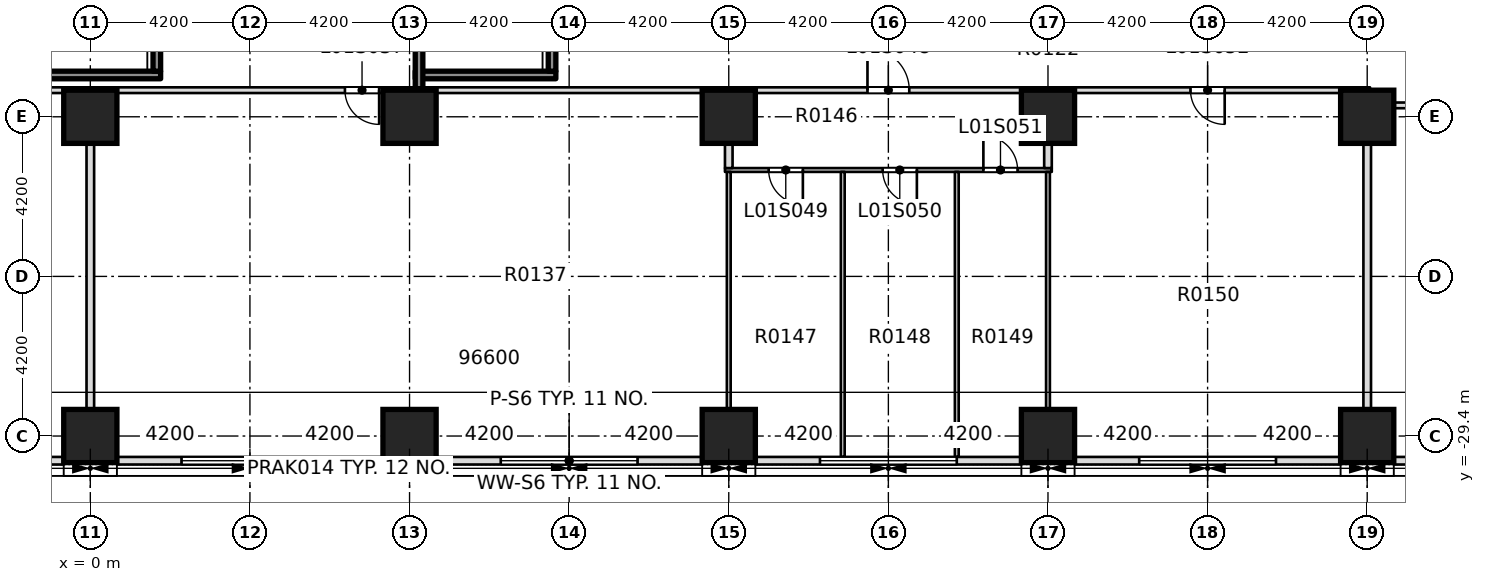
"""IFC4 building model, lengths in metres.
Left out: names, types, materials, properties, quantities, classifications, styles, units other than length and angle.
Written with IfcOpenShell. Run it as: python <this file> out.ifc"""

import sys

from ifc_helpers import new_model, si_unit, direction, frame, frame_2d, origin, origin_2d, place, context, subcontext, project, spatial, rectangle, extrude, element, fill, save


model = new_model("IFC4")
c1 = context("Model", 3, precision=1e-05, world=origin(), true_north=direction((0.0, 1.0)))
c2 = subcontext(c1, "Body", "Model", "MODEL_VIEW")
j1 = project(units=[si_unit("LENGTHUNIT", "METRE"), si_unit("PLANEANGLEUNIT", "RADIAN")], contexts=[c1])
p1 = place(None, origin())
s1 = spatial("IfcSite", under=j1, at=p1, CompositionType="ELEMENT")
p2 = place(p1, origin())
s2 = spatial("IfcBuilding", under=s1, at=p2, CompositionType="ELEMENT")
p3 = place(p2, frame((0.0, 0.0, 7.5)))
s3 = spatial("IfcBuildingStorey", under=s2, at=p3, CompositionType="ELEMENT", Elevation=7.5)
for number, where, z_axis, x_axis in (
    (1, (0.0, -21.0, -0.4), (0.0, 0.0, 1.0), (1.0, 0.0, 0.0)),
    (2, (8.4, -21.0, -0.4), (0.0, 0.0, 1.0), (1.0, 0.0, 0.0)),
    (3, (16.8, -21.0, -0.4), (0.0, 0.0, 1.0), (1.0, 0.0, 0.0)),
    (4, (0.0, -29.4, 0.0), (0.0, 0.0, 1.0), (1.0, 0.0, 0.0)),
    (5, (8.4, -29.4, 0.0), (0.0, 0.0, 1.0), (1.0, 0.0, 0.0)),
    (6, (16.8, -29.4, 0.0), (0.0, 0.0, 1.0), (1.0, 0.0, 0.0)),
    (7, (25.2, -29.4, 0.0), (0.0, 0.0, 1.0), (1.0, 0.0, 0.0)),
):
    element("IfcColumn", number, at=place(p3, frame(where, z_axis=z_axis, x_axis=x_axis)), inside=s3, PredefinedType="COLUMN", context=c2, shape_type="SweptSolid", body=[
        extrude(rectangle(XDim=1.4, YDim=1.4, at=origin_2d()), origin(), (0.0, 0.0, 1.0), 5.0),
    ])
p4 = place(p3, frame((33.6, -29.4, 0.0), z_axis=(0.0, 0.0, 1.0), x_axis=(1.0, 0.0, 0.0)))
e8 = element("IfcColumn", 8, at=p4, inside=s3, PredefinedType="COLUMN", context=c2, shape_type="SweptSolid", body=[
    extrude(rectangle(XDim=1.4, YDim=1.4, at=origin_2d()), origin(), (0.0, 0.0, 1.0), 4.6),
])
p5 = place(p3, frame((25.2, -21.0, 0.0), z_axis=(0.0, 0.0, 1.0), x_axis=(1.0, 0.0, 0.0)))
e9 = element("IfcColumn", 9, at=p5, inside=s3, PredefinedType="COLUMN", context=c2, shape_type="SweptSolid", body=[
    extrude(rectangle(XDim=1.4, YDim=1.4, at=origin_2d()), origin(), (0.0, 0.0, 1.0), 5.0),
])
p6 = place(p3, frame((33.6, -21.0, 0.0), z_axis=(0.0, 0.0, 1.0), x_axis=(1.0, 0.0, 0.0)))
e10 = element("IfcColumn", 10, at=p6, inside=s3, PredefinedType="COLUMN", context=c2, shape_type="SweptSolid", body=[
    extrude(rectangle(XDim=1.4, YDim=1.4, at=origin_2d()), origin(), (0.0, 0.0, 1.0), 4.6),
])
p7 = place(p3, frame((16.7, -22.4, 0.0), z_axis=(0.0, 0.0, 1.0), x_axis=(1.0, 0.0, 0.0)))
e11 = element("IfcWall", 11, at=p7, inside=s3, PredefinedType="PARTITIONING", context=c2, shape_type="SweptSolid", body=[
    extrude(rectangle(XDim=8.6, YDim=0.1, at=frame_2d((4.3, 0.0))), origin(), (0.0, 0.0, 1.0), 4.6),
])
p8 = place(p7, frame((1.15, 0.0, 0.0)))
e12 = element("IfcOpeningElement", 12, at=p8, cuts=e11, PredefinedType="OPENING", context=c2, shape_type="SweptSolid", body=[
    extrude(rectangle(XDim=0.9, YDim=2.1, at=frame_2d((0.45, 1.05))), frame((0.0, 0.06, 0.0), z_axis=(0.0, -1.0, 0.0), x_axis=(1.0, 0.0, 0.0)), (0.0, 0.0, 1.0), 0.12),
])
p9 = place(p7, frame((4.15, 0.0, 0.0)))
e13 = element("IfcOpeningElement", 13, at=p9, cuts=e11, PredefinedType="OPENING", context=c2, shape_type="SweptSolid", body=[
    extrude(rectangle(XDim=0.9, YDim=2.1, at=frame_2d((0.45, 1.05))), frame((0.0, 0.06, 0.0), z_axis=(0.0, -1.0, 0.0), x_axis=(1.0, 0.0, 0.0)), (0.0, 0.0, 1.0), 0.12),
])
p10 = place(p7, frame((6.8, 0.0, 0.0)))
e14 = element("IfcOpeningElement", 14, at=p10, cuts=e11, PredefinedType="OPENING", context=c2, shape_type="SweptSolid", body=[
    extrude(rectangle(XDim=0.9, YDim=2.1, at=frame_2d((0.45, 1.05))), frame((0.0, 0.06, 0.0), z_axis=(0.0, -1.0, 0.0), x_axis=(1.0, 0.0, 0.0)), (0.0, 0.0, 1.0), 0.12),
])
p11 = place(p3, frame((33.5, -20.7, 0.0), z_axis=(0.0, 0.0, 1.0), x_axis=(1.0, 0.0, 0.0)))
e15 = element("IfcWall", 15, at=p11, inside=s3, PredefinedType="PARTITIONING", context=c2, shape_type="SweptSolid", body=[
    extrude(rectangle(XDim=16.975, YDim=0.15, at=frame_2d((8.488, 0.0))), origin(), (0.0, 0.0, 1.0), 4.6),
])
p12 = place(p11, frame((9.3, 0.0, 0.0)))
e16 = element("IfcOpeningElement", 16, at=p12, cuts=e15, PredefinedType="OPENING", context=c2, shape_type="SweptSolid", body=[
    extrude(rectangle(XDim=0.9, YDim=2.1, at=frame_2d((0.45, 1.05))), frame((0.0, 0.085, 0.0), z_axis=(0.0, -1.0, 0.0), x_axis=(1.0, 0.0, 0.0)), (0.0, 0.0, 1.0), 0.17),
])
p13 = place(p3, frame((-34.15, -20.3, 0.0), z_axis=(0.0, 0.0, 1.0), x_axis=(1.0, 0.0, 0.0)))
e17 = element("IfcWall", 17, at=p13, inside=s3, PredefinedType="PARTITIONING", context=c2, shape_type="SweptSolid", body=[
    extrude(rectangle(XDim=67.825, YDim=0.15, at=frame_2d((33.913, 0.0))), origin(), (0.0, 0.0, 1.0), 4.6),
])
p14 = place(p13, frame((12.6, 0.0, 0.0)))
e18 = element("IfcOpeningElement", 18, at=p14, cuts=e17, PredefinedType="OPENING", context=c2, shape_type="SweptSolid", body=[
    extrude(rectangle(XDim=1.1, YDim=2.1, at=frame_2d((0.55, 1.05))), frame((0.0, 0.085, 0.0), z_axis=(0.0, -1.0, 0.0), x_axis=(1.0, 0.0, 0.0)), (0.0, 0.0, 1.0), 0.17),
])
p15 = place(p13, frame((4.025, 0.0, 0.0)))
e19 = element("IfcOpeningElement", 19, at=p15, cuts=e17, PredefinedType="OPENING", context=c2, shape_type="SweptSolid", body=[
    extrude(rectangle(XDim=0.9, YDim=2.1, at=frame_2d((0.45, 1.05))), frame((0.0, 0.085, 0.0), z_axis=(0.0, -1.0, 0.0), x_axis=(1.0, 0.0, 0.0)), (0.0, 0.0, 1.0), 0.17),
])
p16 = place(p13, frame((26.5, 0.0, 0.0)))
e20 = element("IfcOpeningElement", 20, at=p16, cuts=e17, PredefinedType="OPENING", context=c2, shape_type="SweptSolid", body=[
    extrude(rectangle(XDim=0.9, YDim=2.1, at=frame_2d((0.45, 1.05))), frame((0.0, 0.085, 0.0), z_axis=(0.0, -1.0, 0.0), x_axis=(1.0, 0.0, 0.0)), (0.0, 0.0, 1.0), 0.17),
])
p17 = place(p13, frame((40.85, 0.0, 0.0)))
e21 = element("IfcOpeningElement", 21, at=p17, cuts=e17, PredefinedType="OPENING", context=c2, shape_type="SweptSolid", body=[
    extrude(rectangle(XDim=0.9, YDim=2.1, at=frame_2d((0.45, 1.05))), frame((0.0, 0.085, 0.0), z_axis=(0.0, -1.0, 0.0), x_axis=(1.0, 0.0, 0.0)), (0.0, 0.0, 1.0), 0.17),
])
p18 = place(p13, frame((54.6, 0.0, 0.0)))
e22 = element("IfcOpeningElement", 22, at=p18, cuts=e17, PredefinedType="OPENING", context=c2, shape_type="SweptSolid", body=[
    extrude(rectangle(XDim=1.1, YDim=2.1, at=frame_2d((0.55, 1.05))), frame((0.0, 0.085, 0.0), z_axis=(0.0, -1.0, 0.0), x_axis=(1.0, 0.0, 0.0)), (0.0, 0.0, 1.0), 0.17),
])
p19 = place(p13, frame((63.1, 0.0, 0.0)))
e23 = element("IfcOpeningElement", 23, at=p19, cuts=e17, PredefinedType="OPENING", context=c2, shape_type="SweptSolid", body=[
    extrude(rectangle(XDim=0.9, YDim=2.1, at=frame_2d((0.45, 1.05))), frame((0.0, 0.085, 0.0), z_axis=(0.0, -1.0, 0.0), x_axis=(1.0, 0.0, 0.0)), (0.0, 0.0, 1.0), 0.17),
])
p20 = place(p3, frame((0.0, -29.95, 0.0), z_axis=(0.0, 0.0, 1.0), x_axis=(0.0, 1.0, 0.0)))
e24 = element("IfcWall", 24, at=p20, inside=s3, PredefinedType="PARTITIONING", context=c2, shape_type="SweptSolid", body=[
    extrude(rectangle(XDim=9.575, YDim=0.2, at=frame_2d((4.788, 0.0))), origin(), (0.0, 0.0, 1.0), 4.6),
])
p21 = place(p3, frame((16.8, -29.95, 0.0), z_axis=(0.0, 0.0, 1.0), x_axis=(0.0, 1.0, 0.0)))
e25 = element("IfcWall", 25, at=p21, inside=s3, PredefinedType="PARTITIONING", context=c2, shape_type="SweptSolid", body=[
    extrude(rectangle(XDim=7.5, YDim=0.1, at=frame_2d((3.75, 0.0))), origin(), (0.0, 0.0, 1.0), 4.6),
])
p22 = place(p3, frame((16.8, -22.35, 0.0), z_axis=(0.0, 0.0, 1.0), x_axis=(0.0, 1.0, 0.0)))
e26 = element("IfcWall", 26, at=p22, inside=s3, PredefinedType="PARTITIONING", context=c2, shape_type="SweptSolid", body=[
    extrude(rectangle(XDim=1.975, YDim=0.2, at=frame_2d((0.988, 0.0))), origin(), (0.0, 0.0, 1.0), 4.6),
])
for number, where, z_axis, x_axis in (
    (27, (19.8, -29.95, 0.0), (0.0, 0.0, 1.0), (0.0, 1.0, 0.0)),
    (28, (22.8, -29.95, 0.0), (0.0, 0.0, 1.0), (0.0, 1.0, 0.0)),
    (29, (25.2, -29.95, 0.0), (0.0, 0.0, 1.0), (0.0, 1.0, 0.0)),
):
    element("IfcWall", number, at=place(p3, frame(where, z_axis=z_axis, x_axis=x_axis)), inside=s3, PredefinedType="PARTITIONING", context=c2, shape_type="SweptSolid", body=[
        extrude(rectangle(XDim=7.5, YDim=0.1, at=frame_2d((3.75, 0.0))), origin(), (0.0, 0.0, 1.0), 4.6),
    ])
p23 = place(p3, frame((25.2, -22.35, 0.0), z_axis=(0.0, 0.0, 1.0), x_axis=(0.0, 1.0, 0.0)))
e30 = element("IfcWall", 30, at=p23, inside=s3, PredefinedType="PARTITIONING", context=c2, shape_type="SweptSolid", body=[
    extrude(rectangle(XDim=1.975, YDim=0.2, at=frame_2d((0.988, 0.0))), origin(), (0.0, 0.0, 1.0), 4.6),
])
p24 = place(p3, frame((33.6, -29.95, 0.0), z_axis=(0.0, 0.0, 1.0), x_axis=(0.0, 1.0, 0.0)))
e31 = element("IfcWall", 31, at=p24, inside=s3, PredefinedType="PARTITIONING", context=c2, shape_type="SweptSolid", body=[
    extrude(rectangle(XDim=9.175, YDim=0.2, at=frame_2d((4.587, 0.0))), origin(), (0.0, 0.0, 1.0), 4.6),
])
p25 = place(p3, frame((33.6, -20.625, 0.0), z_axis=(0.0, 0.0, 1.0), x_axis=(0.0, 1.0, 0.0)))
e32 = element("IfcWall", 32, at=p25, inside=s3, PredefinedType="PARTITIONING", context=c2, shape_type="SweptSolid", body=[
    extrude(rectangle(XDim=0.25, YDim=0.15, at=frame_2d((0.125, 0.0))), origin(), (0.0, 0.0, 1.0), 4.6),
])
p26 = place(p3, frame((-7.7, -30.05, 0.0), z_axis=(0.0, 0.0, 1.0), x_axis=(1.0, 0.0, 0.0)))
e33 = element("IfcWall", 33, at=p26, inside=s3, PredefinedType="STANDARD", context=c2, shape_type="SweptSolid", body=[
    extrude(rectangle(XDim=7.0, YDim=0.2, at=frame_2d((3.5, 0.0))), origin(), (0.0, 0.0, 1.0), 4.6),
])
p27 = place(p26, frame((1.7, 0.0, 0.9)))
e34 = element("IfcOpeningElement", 34, at=p27, cuts=e33, PredefinedType="OPENING", context=c2, shape_type="SweptSolid", body=[
    extrude(rectangle(XDim=3.6, YDim=2.8, at=frame_2d((1.8, 1.4))), frame((0.0, 0.11, 0.0), z_axis=(0.0, -1.0, 0.0), x_axis=(1.0, 0.0, 0.0)), (0.0, 0.0, 1.0), 0.22),
])
p28 = place(p3, frame((0.7, -30.05, 0.0), z_axis=(0.0, 0.0, 1.0), x_axis=(1.0, 0.0, 0.0)))
e35 = element("IfcWall", 35, at=p28, inside=s3, PredefinedType="STANDARD", context=c2, shape_type="SweptSolid", body=[
    extrude(rectangle(XDim=7.0, YDim=0.2, at=frame_2d((3.5, 0.0))), origin(), (0.0, 0.0, 1.0), 4.6),
])
p29 = place(p28, frame((1.7, 0.0, 0.9)))
e36 = element("IfcOpeningElement", 36, at=p29, cuts=e35, PredefinedType="OPENING", context=c2, shape_type="SweptSolid", body=[
    extrude(rectangle(XDim=3.6, YDim=2.8, at=frame_2d((1.8, 1.4))), frame((0.0, 0.11, 0.0), z_axis=(0.0, -1.0, 0.0), x_axis=(1.0, 0.0, 0.0)), (0.0, 0.0, 1.0), 0.22),
])
p30 = place(p3, frame((9.1, -30.05, 0.0), z_axis=(0.0, 0.0, 1.0), x_axis=(1.0, 0.0, 0.0)))
e37 = element("IfcWall", 37, at=p30, inside=s3, PredefinedType="STANDARD", context=c2, shape_type="SweptSolid", body=[
    extrude(rectangle(XDim=7.0, YDim=0.2, at=frame_2d((3.5, 0.0))), origin(), (0.0, 0.0, 1.0), 4.6),
])
p31 = place(p30, frame((1.7, 0.0, 0.9)))
e38 = element("IfcOpeningElement", 38, at=p31, cuts=e37, PredefinedType="OPENING", context=c2, shape_type="SweptSolid", body=[
    extrude(rectangle(XDim=3.6, YDim=2.8, at=frame_2d((1.8, 1.4))), frame((0.0, 0.11, 0.0), z_axis=(0.0, -1.0, 0.0), x_axis=(1.0, 0.0, 0.0)), (0.0, 0.0, 1.0), 0.22),
])
p32 = place(p3, frame((17.5, -30.05, 0.0), z_axis=(0.0, 0.0, 1.0), x_axis=(1.0, 0.0, 0.0)))
e39 = element("IfcWall", 39, at=p32, inside=s3, PredefinedType="STANDARD", context=c2, shape_type="SweptSolid", body=[
    extrude(rectangle(XDim=7.0, YDim=0.2, at=frame_2d((3.5, 0.0))), origin(), (0.0, 0.0, 1.0), 4.6),
])
p33 = place(p32, frame((1.7, 0.0, 0.9)))
e40 = element("IfcOpeningElement", 40, at=p33, cuts=e39, PredefinedType="OPENING", context=c2, shape_type="SweptSolid", body=[
    extrude(rectangle(XDim=3.6, YDim=2.8, at=frame_2d((1.8, 1.4))), frame((0.0, 0.11, 0.0), z_axis=(0.0, -1.0, 0.0), x_axis=(1.0, 0.0, 0.0)), (0.0, 0.0, 1.0), 0.22),
])
p34 = place(p3, frame((25.9, -30.05, 0.0), z_axis=(0.0, 0.0, 1.0), x_axis=(1.0, 0.0, 0.0)))
e41 = element("IfcWall", 41, at=p34, inside=s3, PredefinedType="STANDARD", context=c2, shape_type="SweptSolid", body=[
    extrude(rectangle(XDim=7.0, YDim=0.2, at=frame_2d((3.5, 0.0))), origin(), (0.0, 0.0, 1.0), 4.6),
])
p35 = place(p34, frame((1.7, 0.0, 0.9)))
e42 = element("IfcOpeningElement", 42, at=p35, cuts=e41, PredefinedType="OPENING", context=c2, shape_type="SweptSolid", body=[
    extrude(rectangle(XDim=3.6, YDim=2.8, at=frame_2d((1.8, 1.4))), frame((0.0, 0.11, 0.0), z_axis=(0.0, -1.0, 0.0), x_axis=(1.0, 0.0, 0.0)), (0.0, 0.0, 1.0), 0.22),
])
p36 = place(p3, frame((34.3, -30.05, 0.0), z_axis=(0.0, 0.0, 1.0), x_axis=(1.0, 0.0, 0.0)))
e43 = element("IfcWall", 43, at=p36, inside=s3, PredefinedType="STANDARD", context=c2, shape_type="SweptSolid", body=[
    extrude(rectangle(XDim=7.0, YDim=0.2, at=frame_2d((3.5, 0.0))), origin(), (0.0, 0.0, 1.0), 4.6),
])
p37 = place(p36, frame((1.7, 0.0, 0.9)))
e44 = element("IfcOpeningElement", 44, at=p37, cuts=e43, PredefinedType="OPENING", context=c2, shape_type="SweptSolid", body=[
    extrude(rectangle(XDim=3.6, YDim=2.8, at=frame_2d((1.8, 1.4))), frame((0.0, 0.11, 0.0), z_axis=(0.0, -1.0, 0.0), x_axis=(1.0, 0.0, 0.0)), (0.0, 0.0, 1.0), 0.22),
])
p38 = place(p3, frame((-1.85, -19.9, 0.0), z_axis=(0.0, 0.0, 1.0), x_axis=(1.0, 0.0, 0.0)))
e45 = element("IfcWall", 45, at=p38, inside=s3, PredefinedType="SOLIDWALL", context=c2, shape_type="SweptSolid", body=[
    extrude(rectangle(XDim=3.7, YDim=0.2, at=frame_2d((1.85, 0.0))), origin(), (0.0, 0.0, 1.0), 4.6),
])
p39 = place(p3, frame((1.75, -19.8, 0.0), z_axis=(0.0, 0.0, 1.0), x_axis=(0.0, 1.0, 0.0)))
e46 = element("IfcWall", 46, at=p39, inside=s3, PredefinedType="SOLIDWALL", context=c2, shape_type="SweptSolid", body=[
    extrude(rectangle(XDim=6.6, YDim=0.2, at=frame_2d((3.3, 0.0))), origin(), (0.0, 0.0, 1.0), 4.6),
])
p40 = place(p3, frame((8.55, -19.9, 0.0), z_axis=(0.0, 0.0, 1.0), x_axis=(1.0, 0.0, 0.0)))
e47 = element("IfcWall", 47, at=p40, inside=s3, PredefinedType="SOLIDWALL", context=c2, shape_type="SweptSolid", body=[
    extrude(rectangle(XDim=3.7, YDim=0.2, at=frame_2d((1.85, 0.0))), origin(), (0.0, 0.0, 1.0), 4.6),
])
p41 = place(p3, frame((8.65, -20.3, 0.0), z_axis=(0.0, 0.0, 1.0), x_axis=(0.0, 1.0, 0.0)))
e48 = element("IfcWall", 48, at=p41, inside=s3, PredefinedType="SOLIDWALL", context=c2, shape_type="SweptSolid", body=[
    extrude(rectangle(XDim=7.1, YDim=0.2, at=frame_2d((3.55, 0.0))), origin(), (0.0, 0.0, 1.0), 4.6),
])
p42 = place(p3, frame((12.15, -19.8, 0.0), z_axis=(0.0, 0.0, 1.0), x_axis=(0.0, 1.0, 0.0)))
e49 = element("IfcWall", 49, at=p42, inside=s3, PredefinedType="SOLIDWALL", context=c2, shape_type="SweptSolid", body=[
    extrude(rectangle(XDim=6.6, YDim=0.2, at=frame_2d((3.3, 0.0))), origin(), (0.0, 0.0, 1.0), 4.6),
])
p43 = place(p17, origin())
e50 = element("IfcDoor", 50, at=p43, inside=s3, OperationType="SINGLE_SWING_LEFT", PredefinedType="DOOR", context=c2, shape_type="SweptSolid", body=[
    extrude(rectangle(XDim=0.9, YDim=2.1, at=frame_2d((0.45, 1.05))), frame((0.0, 0.025, 0.0), z_axis=(0.0, -1.0, 0.0), x_axis=(1.0, 0.0, 0.0)), (0.0, 0.0, 1.0), 0.05),
])
fill(e21, e50)
p44 = place(p18, origin())
e51 = element("IfcDoor", 51, at=p44, inside=s3, OperationType="SINGLE_SWING_RIGHT", PredefinedType="DOOR", context=c2, shape_type="SweptSolid", body=[
    extrude(rectangle(XDim=1.1, YDim=2.1, at=frame_2d((0.55, 1.05))), frame((0.0, 0.025, 0.0), z_axis=(0.0, -1.0, 0.0), x_axis=(1.0, 0.0, 0.0)), (0.0, 0.0, 1.0), 0.05),
])
fill(e22, e51)
p45 = place(p8, origin())
e52 = element("IfcDoor", 52, at=p45, inside=s3, OperationType="SINGLE_SWING_RIGHT", PredefinedType="DOOR", context=c2, shape_type="SweptSolid", body=[
    extrude(rectangle(XDim=0.9, YDim=2.1, at=frame_2d((0.45, 1.05))), frame((0.0, 0.025, 0.0), z_axis=(0.0, -1.0, 0.0), x_axis=(1.0, 0.0, 0.0)), (0.0, 0.0, 1.0), 0.05),
])
fill(e12, e52)
p46 = place(p9, origin())
e53 = element("IfcDoor", 53, at=p46, inside=s3, OperationType="SINGLE_SWING_RIGHT", PredefinedType="DOOR", context=c2, shape_type="SweptSolid", body=[
    extrude(rectangle(XDim=0.9, YDim=2.1, at=frame_2d((0.45, 1.05))), frame((0.0, 0.025, 0.0), z_axis=(0.0, -1.0, 0.0), x_axis=(1.0, 0.0, 0.0)), (0.0, 0.0, 1.0), 0.05),
])
fill(e13, e53)
p47 = place(p10, origin())
e54 = element("IfcDoor", 54, at=p47, inside=s3, OperationType="SINGLE_SWING_RIGHT", PredefinedType="DOOR", context=c2, shape_type="SweptSolid", body=[
    extrude(rectangle(XDim=0.9, YDim=2.1, at=frame_2d((0.45, 1.05))), frame((0.0, 0.025, 0.0), z_axis=(0.0, -1.0, 0.0), x_axis=(1.0, 0.0, 0.0)), (0.0, 0.0, 1.0), 0.05),
])
fill(e14, e54)
p48 = place(p19, origin())
e55 = element("IfcDoor", 55, at=p48, inside=s3, OperationType="SINGLE_SWING_RIGHT", PredefinedType="DOOR", context=c2, shape_type="SweptSolid", body=[
    extrude(rectangle(XDim=0.9, YDim=2.1, at=frame_2d((0.45, 1.05))), frame((0.0, 0.025, 0.0), z_axis=(0.0, -1.0, 0.0), x_axis=(1.0, 0.0, 0.0)), (0.0, 0.0, 1.0), 0.05),
])
fill(e23, e55)
p49 = place(p29, origin())
e56 = element("IfcWindow", 56, at=p49, inside=s3, PartitioningType="SINGLE_PANEL", PredefinedType="WINDOW", context=c2, shape_type="SweptSolid", body=[
    extrude(rectangle(XDim=3.6, YDim=2.8, at=frame_2d((1.8, 1.4))), frame((0.0, 0.03, 0.0), z_axis=(0.0, -1.0, 0.0), x_axis=(1.0, 0.0, 0.0)), (0.0, 0.0, 1.0), 0.06),
])
fill(e36, e56)
p50 = place(p31, origin())
e57 = element("IfcWindow", 57, at=p50, inside=s3, PartitioningType="SINGLE_PANEL", PredefinedType="WINDOW", context=c2, shape_type="SweptSolid", body=[
    extrude(rectangle(XDim=3.6, YDim=2.8, at=frame_2d((1.8, 1.4))), frame((0.0, 0.03, 0.0), z_axis=(0.0, -1.0, 0.0), x_axis=(1.0, 0.0, 0.0)), (0.0, 0.0, 1.0), 0.06),
])
fill(e38, e57)
p51 = place(p33, origin())
e58 = element("IfcWindow", 58, at=p51, inside=s3, PartitioningType="SINGLE_PANEL", PredefinedType="WINDOW", context=c2, shape_type="SweptSolid", body=[
    extrude(rectangle(XDim=3.6, YDim=2.8, at=frame_2d((1.8, 1.4))), frame((0.0, 0.03, 0.0), z_axis=(0.0, -1.0, 0.0), x_axis=(1.0, 0.0, 0.0)), (0.0, 0.0, 1.0), 0.06),
])
fill(e40, e58)
p52 = place(p35, origin())
e59 = element("IfcWindow", 59, at=p52, inside=s3, PartitioningType="SINGLE_PANEL", PredefinedType="WINDOW", context=c2, shape_type="SweptSolid", body=[
    extrude(rectangle(XDim=3.6, YDim=2.8, at=frame_2d((1.8, 1.4))), frame((0.0, 0.03, 0.0), z_axis=(0.0, -1.0, 0.0), x_axis=(1.0, 0.0, 0.0)), (0.0, 0.0, 1.0), 0.06),
])
fill(e42, e59)
save(model, sys.argv[1])
